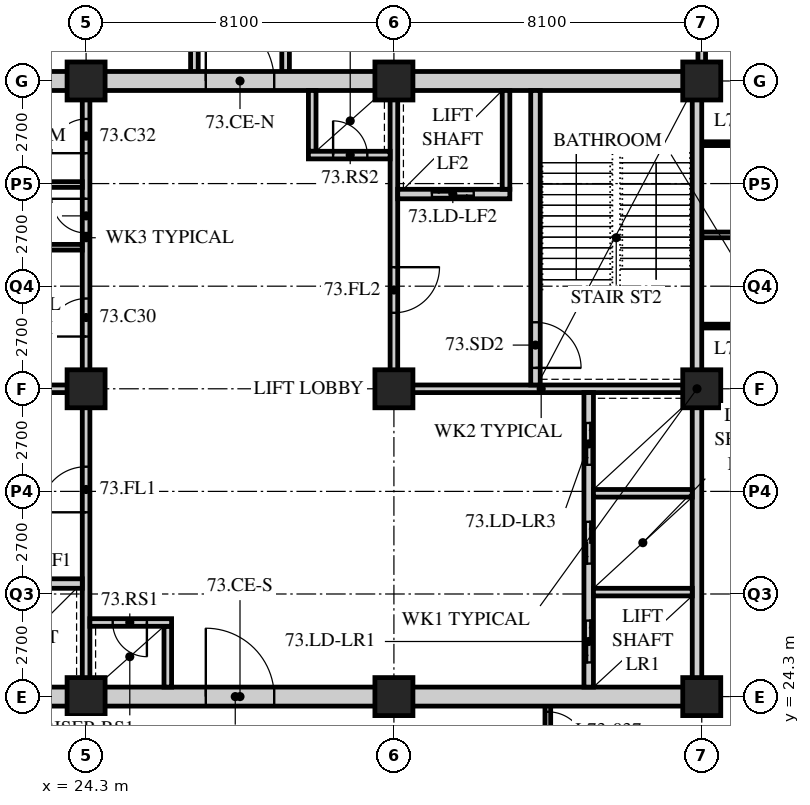
"""IFC4 building model, lengths in metres.
Left out: names, types, materials, properties, quantities, classifications, styles, units other than length and angle.
Written with IfcOpenShell. Run it as: python <this file> out.ifc"""

import sys

from ifc_helpers import new_model, si_unit, direction, frame, frame_2d, origin, origin_2d, place, context, subcontext, project, spatial, rectangle, hollow_rectangle, extrude, element, fill, save


model = new_model("IFC4")
c1 = context("Model", 3, precision=1e-05, world=origin(), true_north=direction((0.0, 1.0)))
c2 = subcontext(c1, "Body", "Model", "MODEL_VIEW")
j1 = project(units=[si_unit("LENGTHUNIT", "METRE"), si_unit("PLANEANGLEUNIT", "RADIAN")], contexts=[c1])
p1 = place(None, origin())
s1 = spatial("IfcSite", under=j1, at=p1, CompositionType="ELEMENT")
p2 = place(p1, origin())
s2 = spatial("IfcBuilding", under=s1, at=p2, CompositionType="ELEMENT")
p3 = place(p2, frame((0.0, 0.0, 285.3)))
s3 = spatial("IfcBuildingStorey", under=s2, at=p3, CompositionType="ELEMENT", Elevation=285.3)
for number, where, z_axis, x_axis in (
    (1, (24.3, 24.3, 0.0), (0.0, 0.0, 1.0), (1.0, 0.0, 0.0)),
    (2, (24.3, 32.4, 0.0), (0.0, 0.0, 1.0), (1.0, 0.0, 0.0)),
    (3, (24.3, 40.5, 0.0), (0.0, 0.0, 1.0), (1.0, 0.0, 0.0)),
    (4, (32.4, 24.3, 0.0), (0.0, 0.0, 1.0), (1.0, 0.0, 0.0)),
    (5, (32.4, 32.4, 0.0), (0.0, 0.0, 1.0), (1.0, 0.0, 0.0)),
    (6, (32.4, 40.5, 0.0), (0.0, 0.0, 1.0), (1.0, 0.0, 0.0)),
    (7, (40.5, 24.3, 0.0), (0.0, 0.0, 1.0), (1.0, 0.0, 0.0)),
    (8, (40.5, 32.4, 0.0), (0.0, 0.0, 1.0), (1.0, 0.0, 0.0)),
    (9, (40.5, 40.5, 0.0), (0.0, 0.0, 1.0), (1.0, 0.0, 0.0)),
):
    element("IfcColumn", number, at=place(p3, frame(where, z_axis=z_axis, x_axis=x_axis)), inside=s3, PredefinedType="COLUMN", context=c2, shape_type="SweptSolid", body=[
        extrude(hollow_rectangle(XDim=1.0, YDim=1.0, WallThickness=0.1, at=origin_2d()), origin(), (0.0, 0.0, 1.0), 3.9),
    ])
for number, where, z_axis, x_axis in (
    (10, (27.15, 40.5, 0.0), (0.0, 0.0, 1.0), (0.0, 1.0, 0.0)),
    (11, (29.55, 40.5, 0.0), (0.0, 0.0, 1.0), (0.0, 1.0, 0.0)),
):
    element("IfcWall", number, at=place(p3, frame(where, z_axis=z_axis, x_axis=x_axis)), inside=s3, PredefinedType="SOLIDWALL", context=c2, shape_type="SweptSolid", body=[
        extrude(rectangle(XDim=6.3, YDim=0.2, at=frame_2d((3.15, 0.0))), origin(), (0.0, 0.0, 1.0), 3.69),
    ])
p4 = place(p3, frame((36.45, 22.5, 0.0), z_axis=(0.0, 0.0, 1.0), x_axis=(0.0, 1.0, 0.0)))
e12 = element("IfcWall", 12, at=p4, inside=s3, PredefinedType="PARTITIONING", context=c2, shape_type="SweptSolid", body=[
    extrude(rectangle(XDim=1.8, YDim=0.15, at=frame_2d((0.9, 0.0))), origin(), (0.0, 0.0, 1.0), 3.69),
])
p5 = place(p4, frame((0.4, 0.0, 0.0)))
e13 = element("IfcOpeningElement", 13, at=p5, cuts=e12, PredefinedType="OPENING", context=c2, shape_type="SweptSolid", body=[
    extrude(rectangle(XDim=1.0, YDim=2.1, at=frame_2d((0.5, 1.05))), frame((0.0, 0.085, 0.0), z_axis=(0.0, -1.0, 0.0), x_axis=(1.0, 0.0, 0.0)), (0.0, 0.0, 1.0), 0.17),
])
p6 = place(p3, frame((40.5, 40.5, 0.0), z_axis=(0.0, 0.0, 1.0), x_axis=(0.0, 1.0, 0.0)))
e14 = element("IfcWall", 14, at=p6, inside=s3, PredefinedType="SOLIDWALL", context=c2, shape_type="SweptSolid", body=[
    extrude(rectangle(XDim=6.3, YDim=0.2, at=frame_2d((3.15, 0.0))), origin(), (0.0, 0.0, 1.0), 3.078),
])
p7 = place(p3, frame((40.5, 34.05, 0.0), z_axis=(0.0, 0.0, 1.0), x_axis=(1.0, 0.0, 0.0)))
e15 = element("IfcWall", 15, at=p7, inside=s3, PredefinedType="PARTITIONING", context=c2, shape_type="SweptSolid", body=[
    extrude(rectangle(XDim=2.4, YDim=0.1, at=frame_2d((1.2, 0.0))), origin(), (0.0, 0.0, 1.0), 3.69),
])
p8 = place(p7, frame((0.8, 0.0, 0.0)))
e16 = element("IfcOpeningElement", 16, at=p8, cuts=e15, PredefinedType="OPENING", context=c2, shape_type="SweptSolid", body=[
    extrude(rectangle(XDim=0.8, YDim=2.1, at=frame_2d((0.4, 1.05))), frame((0.0, 0.06, 0.0), z_axis=(0.0, -1.0, 0.0), x_axis=(1.0, 0.0, 0.0)), (0.0, 0.0, 1.0), 0.12),
])
p9 = place(p3, frame((40.5, 36.45, 0.0), z_axis=(0.0, 0.0, 1.0), x_axis=(1.0, 0.0, 0.0)))
e17 = element("IfcWall", 17, at=p9, inside=s3, PredefinedType="PARTITIONING", context=c2, shape_type="SweptSolid", body=[
    extrude(rectangle(XDim=15.9, YDim=0.15, at=frame_2d((7.95, 0.0))), origin(), (0.0, 0.0, 1.0), 3.69),
])
p10 = place(p3, frame((40.5, 38.85, 0.0), z_axis=(0.0, 0.0, 1.0), x_axis=(1.0, 0.0, 0.0)))
e18 = element("IfcWall", 18, at=p10, inside=s3, PredefinedType="PARTITIONING", context=c2, shape_type="SweptSolid", body=[
    extrude(rectangle(XDim=2.4, YDim=0.1, at=frame_2d((1.2, 0.0))), origin(), (0.0, 0.0, 1.0), 3.69),
])
p11 = place(p10, frame((0.8, 0.0, 0.0)))
e19 = element("IfcOpeningElement", 19, at=p11, cuts=e18, PredefinedType="OPENING", context=c2, shape_type="SweptSolid", body=[
    extrude(rectangle(XDim=0.8, YDim=2.1, at=frame_2d((0.4, 1.05))), frame((0.0, 0.06, 0.0), z_axis=(0.0, -1.0, 0.0), x_axis=(1.0, 0.0, 0.0)), (0.0, 0.0, 1.0), 0.12),
])
p12 = place(p3, frame((15.95, 24.3, 0.0), z_axis=(0.0, 0.0, 1.0), x_axis=(1.0, 0.0, 0.0)))
e20 = element("IfcWall", 20, at=p12, inside=s3, PredefinedType="SOLIDWALL", context=c2, shape_type="SweptSolid", body=[
    extrude(rectangle(XDim=24.55, YDim=0.5, at=frame_2d((12.275, 0.0))), origin(), (0.0, 0.0, 1.0), 3.04),
])
p13 = place(p12, frame((11.5, 0.0, 0.0)))
e21 = element("IfcOpeningElement", 21, at=p13, cuts=e20, PredefinedType="OPENING", context=c2, shape_type="SweptSolid", body=[
    extrude(rectangle(XDim=1.8, YDim=2.4, at=frame_2d((0.9, 1.2))), frame((0.0, 0.26, 0.0), z_axis=(0.0, -1.0, 0.0), x_axis=(1.0, 0.0, 0.0)), (0.0, 0.0, 1.0), 0.52),
])
p14 = place(p3, frame((15.95, 40.5, 0.0), z_axis=(0.0, 0.0, 1.0), x_axis=(1.0, 0.0, 0.0)))
e22 = element("IfcWall", 22, at=p14, inside=s3, PredefinedType="SOLIDWALL", context=c2, shape_type="SweptSolid", body=[
    extrude(rectangle(XDim=24.55, YDim=0.5, at=frame_2d((12.275, 0.0))), origin(), (0.0, 0.0, 1.0), 3.04),
])
p15 = place(p14, frame((11.5, 0.0, 0.0)))
e23 = element("IfcOpeningElement", 23, at=p15, cuts=e22, PredefinedType="OPENING", context=c2, shape_type="SweptSolid", body=[
    extrude(rectangle(XDim=1.8, YDim=2.4, at=frame_2d((0.9, 1.2))), frame((0.0, 0.26, 0.0), z_axis=(0.0, -1.0, 0.0), x_axis=(1.0, 0.0, 0.0)), (0.0, 0.0, 1.0), 0.52),
])
p16 = place(p3, frame((40.375, 24.55, 0.0), z_axis=(0.0, 0.0, 1.0), x_axis=(0.0, 1.0, 0.0)))
e24 = element("IfcWall", 24, at=p16, inside=s3, PredefinedType="SOLIDWALL", context=c2, shape_type="SweptSolid", body=[
    extrude(rectangle(XDim=15.7, YDim=0.25, at=frame_2d((7.85, 0.0))), origin(), (0.0, 0.0, 1.0), 3.078),
])
p17 = place(p3, frame((16.45, 32.4, 0.0), z_axis=(0.0, 0.0, 1.0), x_axis=(1.0, 0.0, 0.0)))
e25 = element("IfcWall", 25, at=p17, inside=s3, PredefinedType="SOLIDWALL", context=c2, shape_type="SweptSolid", body=[
    extrude(rectangle(XDim=7.95, YDim=0.2, at=frame_2d((3.975, 0.0))), origin(), (0.0, 0.0, 1.0), 3.078),
])
p18 = place(p3, frame((24.3, 24.55, 0.0), z_axis=(0.0, 0.0, 1.0), x_axis=(0.0, 1.0, 0.0)))
e26 = element("IfcWall", 26, at=p18, inside=s3, PredefinedType="SOLIDWALL", context=c2, shape_type="SweptSolid", body=[
    extrude(rectangle(XDim=7.75, YDim=0.2, at=frame_2d((3.875, 0.0))), origin(), (0.0, 0.0, 1.0), 3.078),
])
p19 = place(p18, frame((4.6, 0.0, 0.0)))
e27 = element("IfcOpeningElement", 27, at=p19, cuts=e26, PredefinedType="OPENING", context=c2, shape_type="SweptSolid", body=[
    extrude(rectangle(XDim=1.2, YDim=2.1, at=frame_2d((0.6, 1.05))), frame((0.0, 0.11, 0.0), z_axis=(0.0, -1.0, 0.0), x_axis=(1.0, 0.0, 0.0)), (0.0, 0.0, 1.0), 0.22),
])
p20 = place(p3, frame((21.25, 27.275, 0.0), z_axis=(0.0, 0.0, 1.0), x_axis=(1.0, 0.0, 0.0)))
e28 = element("IfcWall", 28, at=p20, inside=s3, PredefinedType="SOLIDWALL", context=c2, shape_type="SweptSolid", body=[
    extrude(rectangle(XDim=2.95, YDim=0.25, at=frame_2d((1.475, 0.0))), origin(), (0.0, 0.0, 1.0), 3.69),
])
p21 = place(p20, frame((0.95, 0.0, 0.0)))
e29 = element("IfcOpeningElement", 29, at=p21, cuts=e28, PredefinedType="OPENING", context=c2, shape_type="SweptSolid", body=[
    extrude(rectangle(XDim=1.1, YDim=2.4, at=frame_2d((0.55, 1.2))), frame((0.0, 0.135, 0.0), z_axis=(0.0, -1.0, 0.0), x_axis=(1.0, 0.0, 0.0)), (0.0, 0.0, 1.0), 0.27),
])
p22 = place(p3, frame((26.45, 24.55, 0.0), z_axis=(0.0, 0.0, 1.0), x_axis=(0.0, 1.0, 0.0)))
e30 = element("IfcWall", 30, at=p22, inside=s3, PredefinedType="SOLIDWALL", context=c2, shape_type="SweptSolid", body=[
    extrude(rectangle(XDim=1.6, YDim=0.2, at=frame_2d((0.8, 0.0))), origin(), (0.0, 0.0, 1.0), 3.69),
])
p23 = place(p3, frame((24.4, 26.25, 0.0), z_axis=(0.0, 0.0, 1.0), x_axis=(1.0, 0.0, 0.0)))
e31 = element("IfcWall", 31, at=p23, inside=s3, PredefinedType="SOLIDWALL", context=c2, shape_type="SweptSolid", body=[
    extrude(rectangle(XDim=2.15, YDim=0.2, at=frame_2d((1.075, 0.0))), origin(), (0.0, 0.0, 1.0), 3.69),
])
p24 = place(p23, frame((0.6, 0.0, 0.0)))
e32 = element("IfcOpeningElement", 32, at=p24, cuts=e31, PredefinedType="OPENING", context=c2, shape_type="SweptSolid", body=[
    extrude(rectangle(XDim=0.9, YDim=2.1, at=frame_2d((0.45, 1.05))), frame((0.0, 0.11, 0.0), z_axis=(0.0, -1.0, 0.0), x_axis=(1.0, 0.0, 0.0)), (0.0, 0.0, 1.0), 0.22),
])
p25 = place(p3, frame((32.3, 32.4, 0.0), z_axis=(0.0, 0.0, 1.0), x_axis=(1.0, 0.0, 0.0)))
e33 = element("IfcWall", 33, at=p25, inside=s3, PredefinedType="SOLIDWALL", context=c2, shape_type="SweptSolid", body=[
    extrude(rectangle(XDim=7.95, YDim=0.2, at=frame_2d((3.975, 0.0))), origin(), (0.0, 0.0, 1.0), 3.078),
])
p26 = place(p3, frame((32.4, 32.5, 0.0), z_axis=(0.0, 0.0, 1.0), x_axis=(0.0, 1.0, 0.0)))
e34 = element("IfcWall", 34, at=p26, inside=s3, PredefinedType="SOLIDWALL", context=c2, shape_type="SweptSolid", body=[
    extrude(rectangle(XDim=7.75, YDim=0.2, at=frame_2d((3.875, 0.0))), origin(), (0.0, 0.0, 1.0), 3.078),
])
p27 = place(p26, frame((1.9, 0.0, 0.0)))
e35 = element("IfcOpeningElement", 35, at=p27, cuts=e34, PredefinedType="OPENING", context=c2, shape_type="SweptSolid", body=[
    extrude(rectangle(XDim=1.2, YDim=2.1, at=frame_2d((0.6, 1.05))), frame((0.0, 0.11, 0.0), z_axis=(0.0, -1.0, 0.0), x_axis=(1.0, 0.0, 0.0)), (0.0, 0.0, 1.0), 0.22),
])
p28 = place(p3, frame((37.525, 24.55, 0.0), z_axis=(0.0, 0.0, 1.0), x_axis=(0.0, 1.0, 0.0)))
e36 = element("IfcWall", 36, at=p28, inside=s3, PredefinedType="SOLIDWALL", context=c2, shape_type="SweptSolid", body=[
    extrude(rectangle(XDim=7.75, YDim=0.25, at=frame_2d((3.875, 0.0))), origin(), (0.0, 0.0, 1.0), 3.69),
])
p29 = place(p28, frame((0.65, 0.0, 0.0)))
e37 = element("IfcOpeningElement", 37, at=p29, cuts=e36, PredefinedType="OPENING", context=c2, shape_type="SweptSolid", body=[
    extrude(rectangle(XDim=1.1, YDim=2.4, at=frame_2d((0.55, 1.2))), frame((0.0, 0.135, 0.0), z_axis=(0.0, -1.0, 0.0), x_axis=(1.0, 0.0, 0.0)), (0.0, 0.0, 1.0), 0.27),
])
p30 = place(p28, frame((3.25, 0.0, 0.0)))
e38 = element("IfcOpeningElement", 38, at=p30, cuts=e36, PredefinedType="OPENING", context=c2, shape_type="SweptSolid", body=[
    extrude(rectangle(XDim=1.1, YDim=2.4, at=frame_2d((0.55, 1.2))), frame((0.0, 0.135, 0.0), z_axis=(0.0, -1.0, 0.0), x_axis=(1.0, 0.0, 0.0)), (0.0, 0.0, 1.0), 0.27),
])
p31 = place(p28, frame((5.85, 0.0, 0.0)))
e39 = element("IfcOpeningElement", 39, at=p31, cuts=e36, PredefinedType="OPENING", context=c2, shape_type="SweptSolid", body=[
    extrude(rectangle(XDim=1.1, YDim=2.4, at=frame_2d((0.55, 1.2))), frame((0.0, 0.135, 0.0), z_axis=(0.0, -1.0, 0.0), x_axis=(1.0, 0.0, 0.0)), (0.0, 0.0, 1.0), 0.27),
])
for number, where, z_axis, x_axis in (
    (40, (37.65, 27.05, 0.0), (0.0, 0.0, 1.0), (1.0, 0.0, 0.0)),
    (41, (37.65, 29.65, 0.0), (0.0, 0.0, 1.0), (1.0, 0.0, 0.0)),
):
    element("IfcWall", number, at=place(p3, frame(where, z_axis=z_axis, x_axis=x_axis)), inside=s3, PredefinedType="SOLIDWALL", context=c2, shape_type="SweptSolid", body=[
        extrude(rectangle(XDim=2.6, YDim=0.2, at=frame_2d((1.3, 0.0))), origin(), (0.0, 0.0, 1.0), 3.69),
    ])
p32 = place(p3, frame((36.125, 32.5, 0.0), z_axis=(0.0, 0.0, 1.0), x_axis=(0.0, 1.0, 0.0)))
e42 = element("IfcWall", 42, at=p32, inside=s3, PredefinedType="SOLIDWALL", context=c2, shape_type="SweptSolid", body=[
    extrude(rectangle(XDim=7.75, YDim=0.25, at=frame_2d((3.875, 0.0))), origin(), (0.0, 0.0, 1.0), 3.69),
])
p33 = place(p32, frame((0.45, 0.0, 0.0)))
e43 = element("IfcOpeningElement", 43, at=p33, cuts=e42, PredefinedType="OPENING", context=c2, shape_type="SweptSolid", body=[
    extrude(rectangle(XDim=1.2, YDim=2.1, at=frame_2d((0.6, 1.05))), frame((0.0, 0.135, 0.0), z_axis=(0.0, -1.0, 0.0), x_axis=(1.0, 0.0, 0.0)), (0.0, 0.0, 1.0), 0.27),
])
p34 = place(p3, frame((32.5, 37.525, 0.0), z_axis=(0.0, 0.0, 1.0), x_axis=(1.0, 0.0, 0.0)))
e44 = element("IfcWall", 44, at=p34, inside=s3, PredefinedType="SOLIDWALL", context=c2, shape_type="SweptSolid", body=[
    extrude(rectangle(XDim=2.95, YDim=0.25, at=frame_2d((1.475, 0.0))), origin(), (0.0, 0.0, 1.0), 3.69),
])
p35 = place(p34, frame((0.9, 0.0, 0.0)))
e45 = element("IfcOpeningElement", 45, at=p35, cuts=e44, PredefinedType="OPENING", context=c2, shape_type="SweptSolid", body=[
    extrude(rectangle(XDim=1.1, YDim=2.4, at=frame_2d((0.55, 1.2))), frame((0.0, 0.135, 0.0), z_axis=(0.0, -1.0, 0.0), x_axis=(1.0, 0.0, 0.0)), (0.0, 0.0, 1.0), 0.27),
])
p36 = place(p3, frame((35.35, 37.65, 0.0), z_axis=(0.0, 0.0, 1.0), x_axis=(0.0, 1.0, 0.0)))
e46 = element("IfcWall", 46, at=p36, inside=s3, PredefinedType="SOLIDWALL", context=c2, shape_type="SweptSolid", body=[
    extrude(rectangle(XDim=2.6, YDim=0.2, at=frame_2d((1.3, 0.0))), origin(), (0.0, 0.0, 1.0), 3.69),
])
p37 = place(p3, frame((30.25, 38.65, 0.0), z_axis=(0.0, 0.0, 1.0), x_axis=(0.0, 1.0, 0.0)))
e47 = element("IfcWall", 47, at=p37, inside=s3, PredefinedType="SOLIDWALL", context=c2, shape_type="SweptSolid", body=[
    extrude(rectangle(XDim=1.6, YDim=0.2, at=frame_2d((0.8, 0.0))), origin(), (0.0, 0.0, 1.0), 3.69),
])
p38 = place(p3, frame((30.15, 38.55, 0.0), z_axis=(0.0, 0.0, 1.0), x_axis=(1.0, 0.0, 0.0)))
e48 = element("IfcWall", 48, at=p38, inside=s3, PredefinedType="SOLIDWALL", context=c2, shape_type="SweptSolid", body=[
    extrude(rectangle(XDim=2.15, YDim=0.2, at=frame_2d((1.075, 0.0))), origin(), (0.0, 0.0, 1.0), 3.69),
])
p39 = place(p38, frame((0.65, 0.0, 0.0)))
e49 = element("IfcOpeningElement", 49, at=p39, cuts=e48, PredefinedType="OPENING", context=c2, shape_type="SweptSolid", body=[
    extrude(rectangle(XDim=0.9, YDim=2.1, at=frame_2d((0.45, 1.05))), frame((0.0, 0.11, 0.0), z_axis=(0.0, -1.0, 0.0), x_axis=(1.0, 0.0, 0.0)), (0.0, 0.0, 1.0), 0.22),
])
p40 = place(p3, frame((24.3, 32.5, 0.0), z_axis=(0.0, 0.0, 1.0), x_axis=(0.0, 1.0, 0.0)))
e50 = element("IfcWall", 50, at=p40, inside=s3, PredefinedType="PARTITIONING", context=c2, shape_type="SweptSolid", body=[
    extrude(rectangle(XDim=7.75, YDim=0.2, at=frame_2d((3.875, 0.0))), origin(), (0.0, 0.0, 1.0), 3.078),
])
p41 = place(p40, frame((1.275, 0.0, 0.0)))
e51 = element("IfcOpeningElement", 51, at=p41, cuts=e50, PredefinedType="OPENING", context=c2, shape_type="SweptSolid", body=[
    extrude(rectangle(XDim=1.0, YDim=2.1, at=frame_2d((0.5, 1.05))), frame((0.0, 0.11, 0.0), z_axis=(0.0, -1.0, 0.0), x_axis=(1.0, 0.0, 0.0)), (0.0, 0.0, 1.0), 0.22),
])
p42 = place(p40, frame((4.0, 0.0, 0.0)))
e52 = element("IfcOpeningElement", 52, at=p42, cuts=e50, PredefinedType="OPENING", context=c2, shape_type="SweptSolid", body=[
    extrude(rectangle(XDim=0.9, YDim=2.1, at=frame_2d((0.45, 1.05))), frame((0.0, 0.11, 0.0), z_axis=(0.0, -1.0, 0.0), x_axis=(1.0, 0.0, 0.0)), (0.0, 0.0, 1.0), 0.22),
])
p43 = place(p40, frame((6.1, 0.0, 0.0)))
e53 = element("IfcOpeningElement", 53, at=p43, cuts=e50, PredefinedType="OPENING", context=c2, shape_type="SweptSolid", body=[
    extrude(rectangle(XDim=0.9, YDim=2.1, at=frame_2d((0.45, 1.05))), frame((0.0, 0.11, 0.0), z_axis=(0.0, -1.0, 0.0), x_axis=(1.0, 0.0, 0.0)), (0.0, 0.0, 1.0), 0.22),
])
for number, where, z_axis, x_axis in (
    (54, (21.05, 36.125, 0.0), (0.0, 0.0, 1.0), (1.0, 0.0, 0.0)),
    (55, (21.05, 37.775, 0.0), (0.0, 0.0, 1.0), (1.0, 0.0, 0.0)),
):
    element("IfcWall", number, at=place(p3, frame(where, z_axis=z_axis, x_axis=x_axis)), inside=s3, PredefinedType="PARTITIONING", context=c2, shape_type="SweptSolid", body=[
        extrude(rectangle(XDim=3.15, YDim=0.15, at=frame_2d((1.575, 0.0))), origin(), (0.0, 0.0, 1.0), 3.69),
    ])
p44 = place(p5, origin())
e56 = element("IfcDoor", 56, at=p44, inside=s3, OperationType="SINGLE_SWING_RIGHT", PredefinedType="DOOR", context=c2, shape_type="SweptSolid", body=[
    extrude(rectangle(XDim=1.0, YDim=2.1, at=frame_2d((0.5, 1.05))), frame((0.0, 0.025, 0.0), z_axis=(0.0, -1.0, 0.0), x_axis=(1.0, 0.0, 0.0)), (0.0, 0.0, 1.0), 0.05),
])
fill(e13, e56)
p45 = place(p41, origin())
e57 = element("IfcDoor", 57, at=p45, inside=s3, OperationType="SINGLE_SWING_LEFT", PredefinedType="DOOR", context=c2, shape_type="SweptSolid", body=[
    extrude(rectangle(XDim=1.0, YDim=2.1, at=frame_2d((0.5, 1.05))), frame((0.0, 0.025, 0.0), z_axis=(0.0, -1.0, 0.0), x_axis=(1.0, 0.0, 0.0)), (0.0, 0.0, 1.0), 0.05),
])
fill(e51, e57)
p46 = place(p42, origin())
e58 = element("IfcDoor", 58, at=p46, inside=s3, OperationType="SINGLE_SWING_RIGHT", PredefinedType="DOOR", context=c2, shape_type="SweptSolid", body=[
    extrude(rectangle(XDim=0.9, YDim=2.1, at=frame_2d((0.45, 1.05))), frame((0.0, 0.025, 0.0), z_axis=(0.0, -1.0, 0.0), x_axis=(1.0, 0.0, 0.0)), (0.0, 0.0, 1.0), 0.05),
])
fill(e52, e58)
p47 = place(p43, origin())
e59 = element("IfcDoor", 59, at=p47, inside=s3, OperationType="SINGLE_SWING_LEFT", PredefinedType="DOOR", context=c2, shape_type="SweptSolid", body=[
    extrude(rectangle(XDim=0.9, YDim=2.1, at=frame_2d((0.45, 1.05))), frame((0.0, 0.025, 0.0), z_axis=(0.0, -1.0, 0.0), x_axis=(1.0, 0.0, 0.0)), (0.0, 0.0, 1.0), 0.05),
])
fill(e53, e59)
p48 = place(p19, origin())
e60 = element("IfcDoor", 60, at=p48, inside=s3, OperationType="SINGLE_SWING_LEFT", PredefinedType="DOOR", context=c2, shape_type="SweptSolid", body=[
    extrude(rectangle(XDim=1.2, YDim=2.1, at=frame_2d((0.6, 1.05))), frame((0.0, 0.025, 0.0), z_axis=(0.0, -1.0, 0.0), x_axis=(1.0, 0.0, 0.0)), (0.0, 0.0, 1.0), 0.05),
])
fill(e27, e60)
p49 = place(p24, origin())
e61 = element("IfcDoor", 61, at=p49, inside=s3, OperationType="SINGLE_SWING_LEFT", PredefinedType="DOOR", context=c2, shape_type="SweptSolid", body=[
    extrude(rectangle(XDim=0.9, YDim=2.1, at=frame_2d((0.45, 1.05))), frame((0.0, 0.025, 0.0), z_axis=(0.0, -1.0, 0.0), x_axis=(1.0, 0.0, 0.0)), (0.0, 0.0, 1.0), 0.05),
])
fill(e32, e61)
p50 = place(p33, origin())
e62 = element("IfcDoor", 62, at=p50, inside=s3, OperationType="SINGLE_SWING_RIGHT", PredefinedType="DOOR", context=c2, shape_type="SweptSolid", body=[
    extrude(rectangle(XDim=1.2, YDim=2.1, at=frame_2d((0.6, 1.05))), frame((0.0, 0.025, 0.0), z_axis=(0.0, -1.0, 0.0), x_axis=(1.0, 0.0, 0.0)), (0.0, 0.0, 1.0), 0.05),
])
fill(e43, e62)
p51 = place(p27, origin())
e63 = element("IfcDoor", 63, at=p51, inside=s3, OperationType="SINGLE_SWING_LEFT", PredefinedType="DOOR", context=c2, shape_type="SweptSolid", body=[
    extrude(rectangle(XDim=1.2, YDim=2.1, at=frame_2d((0.6, 1.05))), frame((0.0, 0.025, 0.0), z_axis=(0.0, -1.0, 0.0), x_axis=(1.0, 0.0, 0.0)), (0.0, 0.0, 1.0), 0.05),
])
fill(e35, e63)
p52 = place(p39, origin())
e64 = element("IfcDoor", 64, at=p52, inside=s3, OperationType="SINGLE_SWING_LEFT", PredefinedType="DOOR", context=c2, shape_type="SweptSolid", body=[
    extrude(rectangle(XDim=0.9, YDim=2.1, at=frame_2d((0.45, 1.05))), frame((0.0, 0.025, 0.0), z_axis=(0.0, -1.0, 0.0), x_axis=(1.0, 0.0, 0.0)), (0.0, 0.0, 1.0), 0.05),
])
fill(e49, e64)
p53 = place(p29, origin())
e65 = element("IfcDoor", 65, at=p53, inside=s3, OperationType="DOUBLE_DOOR_SLIDING", PredefinedType="DOOR", context=c2, shape_type="SweptSolid", body=[
    extrude(rectangle(XDim=1.1, YDim=2.4, at=frame_2d((0.55, 1.2))), frame((0.0, 0.025, 0.0), z_axis=(0.0, -1.0, 0.0), x_axis=(1.0, 0.0, 0.0)), (0.0, 0.0, 1.0), 0.05),
])
fill(e37, e65)
p54 = place(p30, origin())
e66 = element("IfcDoor", 66, at=p54, inside=s3, OperationType="DOUBLE_DOOR_SLIDING", PredefinedType="DOOR", context=c2, shape_type="SweptSolid", body=[
    extrude(rectangle(XDim=1.1, YDim=2.4, at=frame_2d((0.55, 1.2))), frame((0.0, 0.025, 0.0), z_axis=(0.0, -1.0, 0.0), x_axis=(1.0, 0.0, 0.0)), (0.0, 0.0, 1.0), 0.05),
])
fill(e38, e66)
p55 = place(p31, origin())
e67 = element("IfcDoor", 67, at=p55, inside=s3, OperationType="DOUBLE_DOOR_SLIDING", PredefinedType="DOOR", context=c2, shape_type="SweptSolid", body=[
    extrude(rectangle(XDim=1.1, YDim=2.4, at=frame_2d((0.55, 1.2))), frame((0.0, 0.025, 0.0), z_axis=(0.0, -1.0, 0.0), x_axis=(1.0, 0.0, 0.0)), (0.0, 0.0, 1.0), 0.05),
])
fill(e39, e67)
p56 = place(p35, origin())
e68 = element("IfcDoor", 68, at=p56, inside=s3, OperationType="DOUBLE_DOOR_SLIDING", PredefinedType="DOOR", context=c2, shape_type="SweptSolid", body=[
    extrude(rectangle(XDim=1.1, YDim=2.4, at=frame_2d((0.55, 1.2))), frame((0.0, 0.025, 0.0), z_axis=(0.0, -1.0, 0.0), x_axis=(1.0, 0.0, 0.0)), (0.0, 0.0, 1.0), 0.05),
])
fill(e45, e68)
p57 = place(p13, origin())
e69 = element("IfcDoor", 69, at=p57, inside=s3, OperationType="DOUBLE_DOOR_SINGLE_SWING", PredefinedType="DOOR", context=c2, shape_type="SweptSolid", body=[
    extrude(rectangle(XDim=1.8, YDim=2.4, at=frame_2d((0.9, 1.2))), frame((0.0, 0.025, 0.0), z_axis=(0.0, -1.0, 0.0), x_axis=(1.0, 0.0, 0.0)), (0.0, 0.0, 1.0), 0.05),
])
fill(e21, e69)
p58 = place(p15, origin())
e70 = element("IfcDoor", 70, at=p58, inside=s3, OperationType="DOUBLE_DOOR_SINGLE_SWING", PredefinedType="DOOR", context=c2, shape_type="SweptSolid", body=[
    extrude(rectangle(XDim=1.8, YDim=2.4, at=frame_2d((0.9, 1.2))), frame((0.0, 0.025, 0.0), z_axis=(0.0, -1.0, 0.0), x_axis=(1.0, 0.0, 0.0)), (0.0, 0.0, 1.0), 0.05),
])
fill(e23, e70)
save(model, sys.argv[1])
